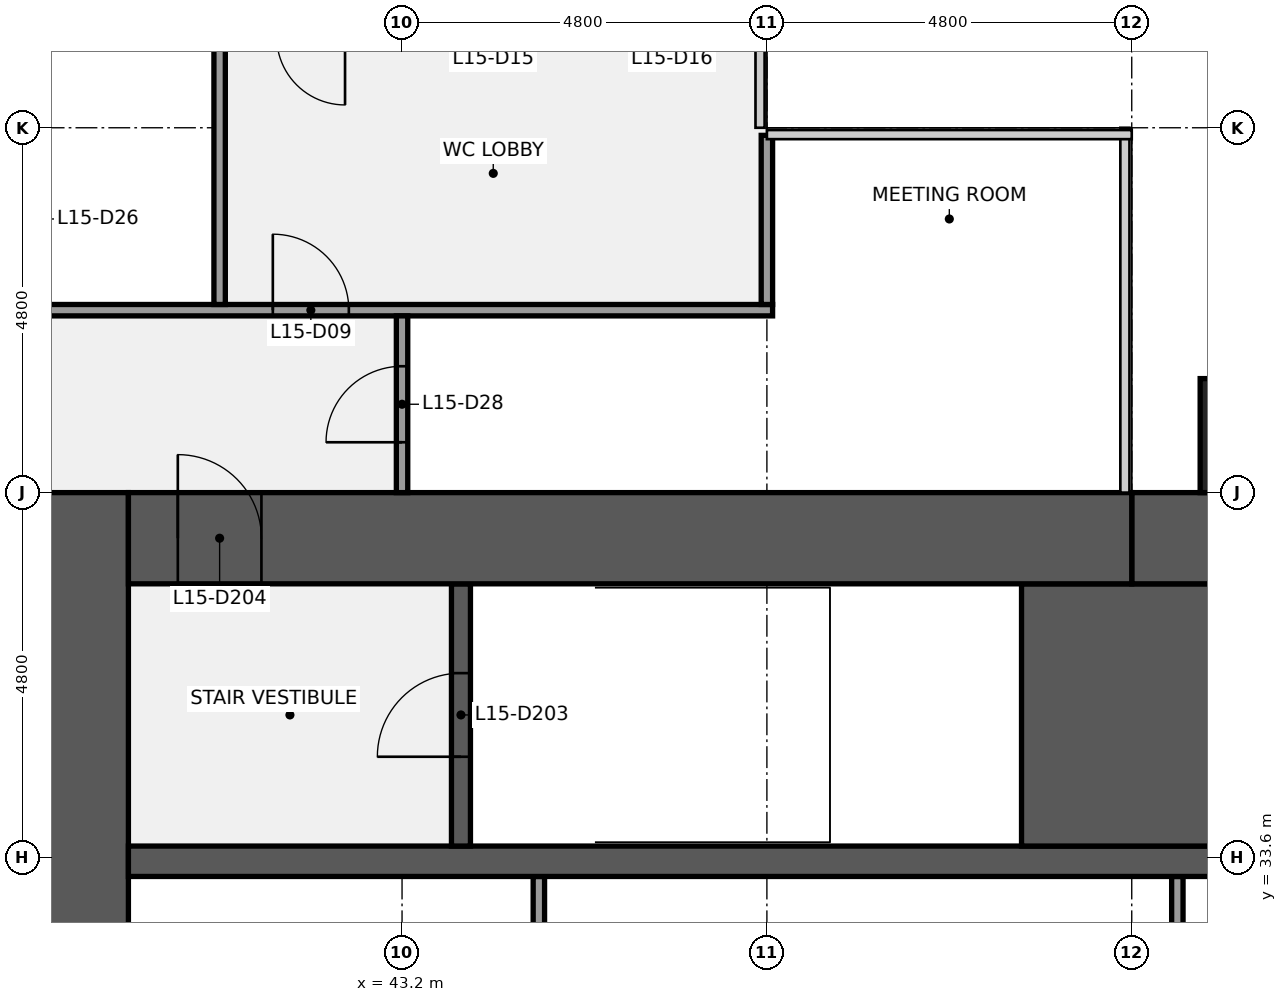
"""IFC4 building model, lengths in metres.
Left out: names, types, materials, properties, quantities, classifications, styles, units other than length and angle.
Written with IfcOpenShell. Run it as: python <this file> out.ifc"""

import sys

from ifc_helpers import new_model, si_unit, direction, frame, frame_2d, origin, origin_2d, place, context, subcontext, project, spatial, rectangle, extrude, element, fill, save


model = new_model("IFC4")
c1 = context("Model", 3, precision=1e-05, world=origin(), true_north=direction((0.0, 1.0)))
c2 = subcontext(c1, "Body", "Model", "MODEL_VIEW")
j1 = project(units=[si_unit("LENGTHUNIT", "METRE"), si_unit("PLANEANGLEUNIT", "RADIAN")], contexts=[c1])
p1 = place(None, origin())
s1 = spatial("IfcSite", under=j1, at=p1, CompositionType="ELEMENT")
p2 = place(p1, origin())
s2 = spatial("IfcBuilding", under=s1, at=p2, CompositionType="ELEMENT")
p3 = place(p2, frame((0.0, 0.0, 71.0)))
s3 = spatial("IfcBuildingStorey", under=s2, at=p3, CompositionType="ELEMENT", Elevation=71.0)
p4 = place(p3, frame((39.0, 9.6, 0.0), z_axis=(0.0, 0.0, 1.0), x_axis=(0.0, 1.0, 0.0)))
e1 = element("IfcWall", 1, at=p4, inside=s3, PredefinedType="SHEAR", context=c2, shape_type="SweptSolid", body=[
    extrude(rectangle(XDim=28.8, YDim=1.2, at=frame_2d((14.4, 0.0))), origin(), (0.0, 0.0, 1.0), 3.84),
])
p5 = place(p4, frame((8.7, 0.0, 0.0)))
e2 = element("IfcOpeningElement", 2, at=p5, cuts=e1, PredefinedType="OPENING", context=c2, shape_type="SweptSolid", body=[
    extrude(rectangle(XDim=1.8, YDim=2.1, at=frame_2d((0.9, 1.05))), frame((0.0, 0.61, 0.0), z_axis=(0.0, -1.0, 0.0), x_axis=(1.0, 0.0, 0.0)), (0.0, 0.0, 1.0), 1.22),
])
p6 = place(p4, frame((18.3, 0.0, 0.0)))
e3 = element("IfcOpeningElement", 3, at=p6, cuts=e1, PredefinedType="OPENING", context=c2, shape_type="SweptSolid", body=[
    extrude(rectangle(XDim=1.8, YDim=2.1, at=frame_2d((0.9, 1.05))), frame((0.0, 0.61, 0.0), z_axis=(0.0, -1.0, 0.0), x_axis=(1.0, 0.0, 0.0)), (0.0, 0.0, 1.0), 1.22),
])
for number, where, z_axis, x_axis in (
    (4, (53.4, 30.75, 0.0), (0.0, 0.0, 1.0), (0.0, 1.0, 0.0)),
    (5, (45.0, 30.75, 0.0), (0.0, 0.0, 1.0), (0.0, 1.0, 0.0)),
):
    element("IfcWall", number, at=place(p3, frame(where, z_axis=z_axis, x_axis=x_axis)), inside=s3, PredefinedType="PARTITIONING", context=c2, shape_type="SweptSolid", body=[
        extrude(rectangle(XDim=2.6, YDim=0.15, at=frame_2d((1.3, 0.0))), origin(), (0.0, 0.0, 1.0), 3.84),
    ])
p7 = place(p3, frame((39.6, 33.55, 0.0), z_axis=(0.0, 0.0, 1.0), x_axis=(1.0, 0.0, 0.0)))
e6 = element("IfcWall", 6, at=p7, inside=s3, PredefinedType="SHEAR", context=c2, shape_type="SweptSolid", body=[
    extrude(rectangle(XDim=16.8, YDim=0.4, at=frame_2d((8.4, 0.0))), origin(), (0.0, 0.0, 1.0), 3.84),
])
p8 = place(p3, frame((51.35, 35.475, 0.0), z_axis=(0.0, 0.0, 1.0), x_axis=(1.0, 0.0, 0.0)))
e7 = element("IfcWall", 7, at=p8, inside=s3, PredefinedType="SHEAR", context=c2, shape_type="SweptSolid", body=[
    extrude(rectangle(XDim=5.05, YDim=3.45, at=frame_2d((2.525, 0.0))), origin(), (0.0, 0.0, 1.0), 3.84),
])
p9 = place(p3, frame((43.975, 33.75, 0.0), z_axis=(0.0, 0.0, 1.0), x_axis=(0.0, 1.0, 0.0)))
e8 = element("IfcWall", 8, at=p9, inside=s3, PredefinedType="SHEAR", context=c2, shape_type="SweptSolid", body=[
    extrude(rectangle(XDim=3.45, YDim=0.25, at=frame_2d((1.725, 0.0))), origin(), (0.0, 0.0, 1.0), 3.84),
])
p10 = place(p9, frame((1.175, 0.0, 0.0)))
e9 = element("IfcOpeningElement", 9, at=p10, cuts=e8, PredefinedType="OPENING", context=c2, shape_type="SweptSolid", body=[
    extrude(rectangle(XDim=1.1, YDim=2.1, at=frame_2d((0.55, 1.05))), frame((0.0, 0.135, 0.0), z_axis=(0.0, -1.0, 0.0), x_axis=(1.0, 0.0, 0.0)), (0.0, 0.0, 1.0), 0.27),
])
p11 = place(p3, frame((52.8, 37.8, 0.0), z_axis=(0.0, 0.0, 1.0), x_axis=(1.0, 0.0, 0.0)))
e10 = element("IfcWall", 10, at=p11, inside=s3, PredefinedType="SHEAR", context=c2, shape_type="SweptSolid", body=[
    extrude(rectangle(XDim=3.6, YDim=1.2, at=frame_2d((1.8, 0.0))), origin(), (0.0, 0.0, 1.0), 3.84),
])
p12 = place(p3, frame((39.6, 37.8, 0.0), z_axis=(0.0, 0.0, 1.0), x_axis=(1.0, 0.0, 0.0)))
e11 = element("IfcWall", 11, at=p12, inside=s3, PredefinedType="SHEAR", context=c2, shape_type="SweptSolid", body=[
    extrude(rectangle(XDim=13.2, YDim=1.2, at=frame_2d((6.6, 0.0))), origin(), (0.0, 0.0, 1.0), 3.84),
])
p13 = place(p12, frame((0.65, 0.0, 0.0)))
e12 = element("IfcOpeningElement", 12, at=p13, cuts=e11, PredefinedType="OPENING", context=c2, shape_type="SweptSolid", body=[
    extrude(rectangle(XDim=1.1, YDim=2.1, at=frame_2d((0.55, 1.05))), frame((0.0, 0.61, 0.0), z_axis=(0.0, -1.0, 0.0), x_axis=(1.0, 0.0, 0.0)), (0.0, 0.0, 1.0), 1.22),
])
p14 = place(p3, frame((38.325, 40.8, 0.0), z_axis=(0.0, 0.0, 1.0), x_axis=(1.0, 0.0, 0.0)))
e13 = element("IfcWall", 13, at=p14, inside=s3, PredefinedType="PARTITIONING", context=c2, shape_type="SweptSolid", body=[
    extrude(rectangle(XDim=9.75, YDim=0.15, at=frame_2d((4.875, 0.0))), origin(), (0.0, 0.0, 1.0), 2.87),
])
p15 = place(p14, frame((3.175, 0.0, 0.0)))
e14 = element("IfcOpeningElement", 14, at=p15, cuts=e13, PredefinedType="OPENING", context=c2, shape_type="SweptSolid", body=[
    extrude(rectangle(XDim=1.0, YDim=2.1, at=frame_2d((0.5, 1.05))), frame((0.0, 0.085, 0.0), z_axis=(0.0, -1.0, 0.0), x_axis=(1.0, 0.0, 0.0)), (0.0, 0.0, 1.0), 0.17),
])
p16 = place(p3, frame((40.8, 40.875, 0.0), z_axis=(0.0, 0.0, 1.0), x_axis=(0.0, 1.0, 0.0)))
e15 = element("IfcWall", 15, at=p16, inside=s3, PredefinedType="PARTITIONING", context=c2, shape_type="SweptSolid", body=[
    extrude(rectangle(XDim=3.45, YDim=0.15, at=frame_2d((1.725, 0.0))), origin(), (0.0, 0.0, 1.0), 2.87),
])
p17 = place(p3, frame((43.2, 38.4, 0.0), z_axis=(0.0, 0.0, 1.0), x_axis=(0.0, 1.0, 0.0)))
e16 = element("IfcWall", 16, at=p17, inside=s3, PredefinedType="PARTITIONING", context=c2, shape_type="SweptSolid", body=[
    extrude(rectangle(XDim=2.325, YDim=0.15, at=frame_2d((1.163, 0.0))), origin(), (0.0, 0.0, 1.0), 2.87),
])
p18 = place(p17, frame((0.663, 0.0, 0.0)))
e17 = element("IfcOpeningElement", 17, at=p18, cuts=e16, PredefinedType="OPENING", context=c2, shape_type="SweptSolid", body=[
    extrude(rectangle(XDim=1.0, YDim=2.1, at=frame_2d((0.5, 1.05))), frame((0.0, 0.085, 0.0), z_axis=(0.0, -1.0, 0.0), x_axis=(1.0, 0.0, 0.0)), (0.0, 0.0, 1.0), 0.17),
])
p19 = place(p3, frame((48.0, 40.875, 0.0), z_axis=(0.0, 0.0, 1.0), x_axis=(0.0, 1.0, 0.0)))
e18 = element("IfcWall", 18, at=p19, inside=s3, PredefinedType="PARTITIONING", context=c2, shape_type="SweptSolid", body=[
    extrude(rectangle(XDim=2.225, YDim=0.15, at=frame_2d((1.113, 0.0))), origin(), (0.0, 0.0, 1.0), 2.87),
])
p20 = place(p3, frame((55.2, 39.15, 0.0), z_axis=(0.0, 0.0, 1.0), x_axis=(1.0, 0.0, 0.0)))
e19 = element("IfcColumn", 19, at=p20, inside=s3, PredefinedType="PILASTER", context=c2, shape_type="SweptSolid", body=[
    extrude(rectangle(XDim=3.0, YDim=1.5, at=origin_2d()), origin(), (0.0, 0.0, 1.0), 4.0),
])
p21 = place(p10, origin())
e20 = element("IfcDoor", 20, at=p21, inside=s3, OperationType="SINGLE_SWING_LEFT", PredefinedType="DOOR", context=c2, shape_type="SweptSolid", body=[
    extrude(rectangle(XDim=1.1, YDim=2.1, at=frame_2d((0.55, 1.05))), frame((0.0, 0.025, 0.0), z_axis=(0.0, -1.0, 0.0), x_axis=(1.0, 0.0, 0.0)), (0.0, 0.0, 1.0), 0.05),
])
fill(e9, e20)
p22 = place(p13, origin())
e21 = element("IfcDoor", 21, at=p22, inside=s3, OperationType="SINGLE_SWING_LEFT", PredefinedType="DOOR", context=c2, shape_type="SweptSolid", body=[
    extrude(rectangle(XDim=1.1, YDim=2.1, at=frame_2d((0.55, 1.05))), frame((0.0, 0.025, 0.0), z_axis=(0.0, -1.0, 0.0), x_axis=(1.0, 0.0, 0.0)), (0.0, 0.0, 1.0), 0.05),
])
fill(e12, e21)
p23 = place(p15, origin())
e22 = element("IfcDoor", 22, at=p23, inside=s3, OperationType="SINGLE_SWING_LEFT", PredefinedType="DOOR", context=c2, shape_type="SweptSolid", body=[
    extrude(rectangle(XDim=1.0, YDim=2.1, at=frame_2d((0.5, 1.05))), frame((0.0, 0.025, 0.0), z_axis=(0.0, -1.0, 0.0), x_axis=(1.0, 0.0, 0.0)), (0.0, 0.0, 1.0), 0.05),
])
fill(e14, e22)
p24 = place(p18, origin())
e23 = element("IfcDoor", 23, at=p24, inside=s3, OperationType="SINGLE_SWING_LEFT", PredefinedType="DOOR", context=c2, shape_type="SweptSolid", body=[
    extrude(rectangle(XDim=1.0, YDim=2.1, at=frame_2d((0.5, 1.05))), frame((0.0, 0.025, 0.0), z_axis=(0.0, -1.0, 0.0), x_axis=(1.0, 0.0, 0.0)), (0.0, 0.0, 1.0), 0.05),
])
fill(e17, e23)
save(model, sys.argv[1])
